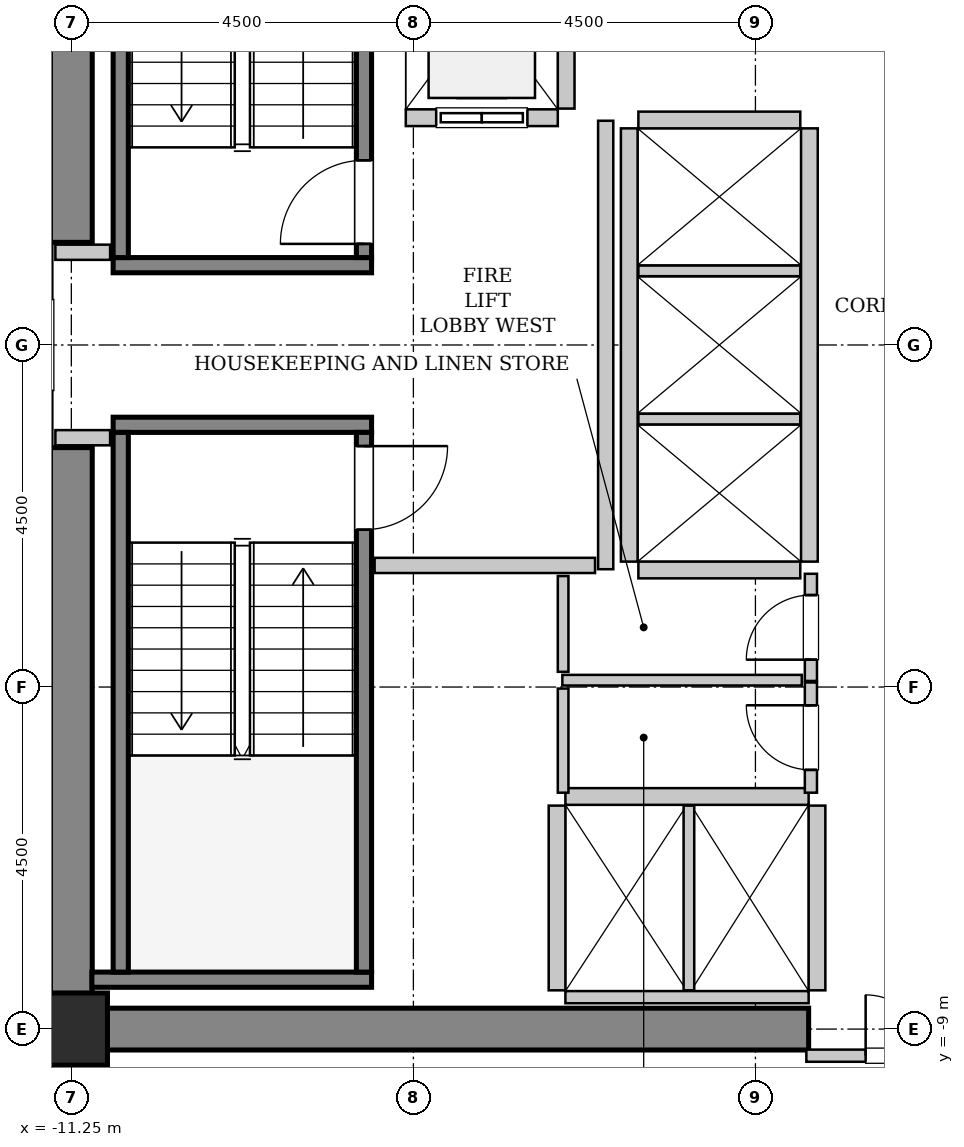
"""IFC4 building model, lengths in metres.
Left out: names, types, materials, properties, quantities, classifications, styles, units other than length and angle.
Written with IfcOpenShell. Run it as: python <this file> out.ifc"""

import sys

from ifc_helpers import new_model, si_unit, direction, frame, frame_2d, origin, origin_2d, place, context, subcontext, project, spatial, rectangle, hollow_rectangle, extrude, source, transform, mapped, element, fill, save


model = new_model("IFC4")
c1 = context("Model", 3, precision=1e-05, world=origin(), true_north=direction((0.0, 1.0)))
c2 = subcontext(c1, "Body", "Model", "MODEL_VIEW")
j1 = project(units=[si_unit("LENGTHUNIT", "METRE"), si_unit("PLANEANGLEUNIT", "RADIAN")], contexts=[c1])
p1 = place(None, origin())
s1 = spatial("IfcSite", under=j1, at=p1, CompositionType="ELEMENT")
p2 = place(p1, origin())
s2 = spatial("IfcBuilding", under=s1, at=p2, CompositionType="ELEMENT")
p3 = place(p2, frame((0.0, 0.0, 90.8)))
s3 = spatial("IfcBuildingStorey", under=s2, at=p3, CompositionType="ELEMENT", Elevation=90.8)
m1 = source(origin(), c2, "Body", "SweptSolid", [
    extrude(rectangle(XDim=9.975, YDim=0.55, at=frame_2d((4.987, 0.0))), origin(), (0.0, 0.0, 1.0), 3.8),
])
p4 = place(p3, frame((-11.525, -9.0, 0.0), z_axis=(0.0, 0.0, 1.0), x_axis=(1.0, 0.0, 0.0)))
e1 = element("IfcWall", 1, at=p4, inside=s3, PredefinedType="SHEAR", context=c2, shape_type="MappedRepresentation", body=[
    mapped(m1, transform((0.0, 0.0, 0.0), x_axis=(1.0, 0.0, 0.0), y_axis=(0.0, 1.0, 0.0), z_axis=(0.0, 0.0, 1.0), scale=1.0)),
])
m2 = source(origin(), c2, "Body", "SweptSolid", [
    extrude(rectangle(XDim=7.375, YDim=0.55, at=frame_2d((3.688, 0.0))), origin(), (0.0, 0.0, 1.0), 3.8),
])
for number, where, z_axis, x_axis in (
    (2, (-11.25, -8.725, 0.0), (0.0, 0.0, 1.0), (0.0, 1.0, 0.0)),
    (3, (-11.25, 1.35, 0.0), (0.0, 0.0, 1.0), (0.0, 1.0, 0.0)),
):
    element("IfcWall", number, at=place(p3, frame(where, z_axis=z_axis, x_axis=x_axis)), inside=s3, PredefinedType="SHEAR", context=c2, shape_type="MappedRepresentation", body=[
        mapped(m2, transform((0.0, 0.0, 0.0), x_axis=(1.0, 0.0, 0.0), y_axis=(0.0, 1.0, 0.0), z_axis=(0.0, 0.0, 1.0), scale=1.0)),
    ])
m3 = source(origin(), c2, "Body", "SweptSolid", [
    extrude(hollow_rectangle(XDim=0.95, YDim=0.95, WallThickness=0.045, InnerFilletRadius=0.045, OuterFilletRadius=0.09, at=origin_2d()), origin(), (0.0, 0.0, 1.0), 3.8),
])
p5 = place(p3, frame((-11.25, -9.0, 0.0), z_axis=(0.0, 0.0, 1.0), x_axis=(1.0, 0.0, 0.0)))
e4 = element("IfcColumn", 4, at=p5, inside=s3, PredefinedType="COLUMN", context=c2, shape_type="MappedRepresentation", body=[
    mapped(m3, transform((0.0, 0.0, 0.0), x_axis=(1.0, 0.0, 0.0), y_axis=(0.0, 1.0, 0.0), z_axis=(0.0, 0.0, 1.0), scale=1.0)),
])
m4 = source(origin(), c2, "Body", "SweptSolid", [
    extrude(rectangle(XDim=3.4, YDim=0.2, at=frame_2d((1.7, 0.0))), origin(), (0.0, 0.0, 1.0), 3.8),
])
p6 = place(p3, frame((-7.3, 1.05, 0.0), z_axis=(0.0, 0.0, 1.0), x_axis=(-1.0, 0.0, 0.0)))
e5 = element("IfcWall", 5, at=p6, inside=s3, PredefinedType="SOLIDWALL", context=c2, shape_type="MappedRepresentation", body=[
    mapped(m4, transform((0.0, 0.0, 0.0), x_axis=(1.0, 0.0, 0.0), y_axis=(0.0, 1.0, 0.0), z_axis=(0.0, 0.0, 1.0), scale=1.0)),
])
m5 = source(origin(), c2, "Body", "SweptSolid", [
    extrude(rectangle(XDim=7.1, YDim=0.2, at=frame_2d((3.55, 0.0))), origin(), (0.0, 0.0, 1.0), 3.8),
])
p7 = place(p3, frame((-7.4, 1.15, 0.0), z_axis=(0.0, 0.0, 1.0), x_axis=(0.0, 1.0, 0.0)))
e6 = element("IfcWall", 6, at=p7, inside=s3, PredefinedType="SOLIDWALL", context=c2, shape_type="MappedRepresentation", body=[
    mapped(m5, transform((0.0, 0.0, 0.0), x_axis=(1.0, 0.0, 0.0), y_axis=(0.0, 1.0, 0.0), z_axis=(0.0, 0.0, 1.0), scale=1.0)),
])
p8 = place(p7, frame((0.18, 0.0, 0.0)))
e7 = element("IfcOpeningElement", 7, at=p8, cuts=e6, PredefinedType="OPENING", context=c2, shape_type="SweptSolid", body=[
    extrude(rectangle(XDim=1.1, YDim=2.15, at=frame_2d((0.55, 1.075))), frame((0.0, 0.11, 0.0), z_axis=(0.0, -1.0, 0.0), x_axis=(1.0, 0.0, 0.0)), (0.0, 0.0, 1.0), 0.22),
])
p9 = place(p3, frame((-10.6, 1.15, 0.0), z_axis=(0.0, 0.0, 1.0), x_axis=(0.0, 1.0, 0.0)))
e8 = element("IfcWall", 8, at=p9, inside=s3, PredefinedType="SOLIDWALL", context=c2, shape_type="MappedRepresentation", body=[
    mapped(m5, transform((0.0, 0.0, 0.0), x_axis=(1.0, 0.0, 0.0), y_axis=(0.0, 1.0, 0.0), z_axis=(0.0, 0.0, 1.0), scale=1.0)),
])
p10 = place(p3, frame((-10.7, -1.05, 0.0), z_axis=(0.0, 0.0, 1.0), x_axis=(1.0, 0.0, 0.0)))
e9 = element("IfcWall", 9, at=p10, inside=s3, PredefinedType="SOLIDWALL", context=c2, shape_type="MappedRepresentation", body=[
    mapped(m4, transform((0.0, 0.0, 0.0), x_axis=(1.0, 0.0, 0.0), y_axis=(0.0, 1.0, 0.0), z_axis=(0.0, 0.0, 1.0), scale=1.0)),
])
m6 = source(origin(), c2, "Body", "SweptSolid", [
    extrude(rectangle(XDim=3.68, YDim=0.2, at=frame_2d((1.84, 0.0))), origin(), (0.0, 0.0, 1.0), 3.8),
])
p11 = place(p3, frame((-10.98, -8.35, 0.0), z_axis=(0.0, 0.0, 1.0), x_axis=(1.0, 0.0, 0.0)))
e10 = element("IfcWall", 10, at=p11, inside=s3, PredefinedType="SOLIDWALL", context=c2, shape_type="MappedRepresentation", body=[
    mapped(m6, transform((0.0, 0.0, 0.0), x_axis=(1.0, 0.0, 0.0), y_axis=(0.0, 1.0, 0.0), z_axis=(0.0, 0.0, 1.0), scale=1.0)),
])
p12 = place(p3, frame((-10.6, -1.15, 0.0), z_axis=(0.0, 0.0, 1.0), x_axis=(0.0, -1.0, 0.0)))
e11 = element("IfcWall", 11, at=p12, inside=s3, PredefinedType="SOLIDWALL", context=c2, shape_type="MappedRepresentation", body=[
    mapped(m5, transform((0.0, 0.0, 0.0), x_axis=(1.0, 0.0, 0.0), y_axis=(0.0, 1.0, 0.0), z_axis=(0.0, 0.0, 1.0), scale=1.0)),
])
p13 = place(p3, frame((-7.4, -1.15, 0.0), z_axis=(0.0, 0.0, 1.0), x_axis=(0.0, -1.0, 0.0)))
e12 = element("IfcWall", 12, at=p13, inside=s3, PredefinedType="SOLIDWALL", context=c2, shape_type="MappedRepresentation", body=[
    mapped(m5, transform((0.0, 0.0, 0.0), x_axis=(1.0, 0.0, 0.0), y_axis=(0.0, 1.0, 0.0), z_axis=(0.0, 0.0, 1.0), scale=1.0)),
])
p14 = place(p13, frame((0.18, 0.0, 0.0)))
e13 = element("IfcOpeningElement", 13, at=p14, cuts=e12, PredefinedType="OPENING", context=c2, shape_type="SweptSolid", body=[
    extrude(rectangle(XDim=1.1, YDim=2.15, at=frame_2d((0.55, 1.075))), frame((0.0, 0.11, 0.0), z_axis=(0.0, -1.0, 0.0), x_axis=(1.0, 0.0, 0.0)), (0.0, 0.0, 1.0), 0.22),
])
m7 = source(origin(), c2, "Body", "SweptSolid", [
    extrude(rectangle(XDim=2.0, YDim=0.22, at=frame_2d((1.0, 0.0))), origin(), (0.0, 0.0, 1.0), 3.535),
])
p15 = place(p3, frame((-6.85, 2.99, 0.0), z_axis=(0.0, 0.0, 1.0), x_axis=(1.0, 0.0, 0.0)))
e14 = element("IfcWall", 14, at=p15, inside=s3, PredefinedType="SOLIDWALL", context=c2, shape_type="MappedRepresentation", body=[
    mapped(m7, transform((0.0, 0.0, 0.0), x_axis=(1.0, 0.0, 0.0), y_axis=(0.0, 1.0, 0.0), z_axis=(0.0, 0.0, 1.0), scale=1.0)),
])
p16 = place(p15, frame((0.4, 0.0, 0.0)))
e15 = element("IfcOpeningElement", 15, at=p16, cuts=e14, PredefinedType="OPENING", context=c2, shape_type="SweptSolid", body=[
    extrude(rectangle(XDim=1.2, YDim=2.2, at=frame_2d((0.6, 1.1))), frame((0.0, 0.12, 0.0), z_axis=(0.0, -1.0, 0.0), x_axis=(1.0, 0.0, 0.0)), (0.0, 0.0, 1.0), 0.24),
])
m8 = source(origin(), c2, "Body", "SweptSolid", [
    extrude(rectangle(XDim=2.68, YDim=0.22, at=frame_2d((1.34, 0.0))), origin(), (0.0, 0.0, 1.0), 3.535),
])
p17 = place(p3, frame((-4.74, 3.11, 0.0), z_axis=(0.0, 0.0, 1.0), x_axis=(0.0, 1.0, 0.0)))
e16 = element("IfcWall", 16, at=p17, inside=s3, PredefinedType="SOLIDWALL", context=c2, shape_type="MappedRepresentation", body=[
    mapped(m8, transform((0.0, 0.0, 0.0), x_axis=(1.0, 0.0, 0.0), y_axis=(0.0, 1.0, 0.0), z_axis=(0.0, 0.0, 1.0), scale=1.0)),
])
m9 = source(origin(), c2, "Body", "SweptSolid", [
    extrude(rectangle(XDim=3.2, YDim=0.22, at=frame_2d((1.6, 0.0))), origin(), (0.0, 0.0, 1.0), 3.535),
])
p18 = place(p3, frame((-1.55, -5.94, 0.0), z_axis=(0.0, 0.0, 1.0), x_axis=(-1.0, 0.0, 0.0)))
e17 = element("IfcWall", 17, at=p18, inside=s3, PredefinedType="SOLIDWALL", context=c2, shape_type="MappedRepresentation", body=[
    mapped(m9, transform((0.0, 0.0, 0.0), x_axis=(1.0, 0.0, 0.0), y_axis=(0.0, 1.0, 0.0), z_axis=(0.0, 0.0, 1.0), scale=1.0)),
])
m10 = source(origin(), c2, "Body", "SweptSolid", [
    extrude(rectangle(XDim=3.2, YDim=0.16, at=frame_2d((1.6, 0.0))), origin(), (0.0, 0.0, 1.0), 2.425),
])
p19 = place(p3, frame((-4.75, -8.58, 0.0), z_axis=(0.0, 0.0, 1.0), x_axis=(1.0, 0.0, 0.0)))
e18 = element("IfcWall", 18, at=p19, inside=s3, PredefinedType="PARTITIONING", context=c2, shape_type="MappedRepresentation", body=[
    mapped(m10, transform((0.0, 0.0, 0.0), x_axis=(1.0, 0.0, 0.0), y_axis=(0.0, 1.0, 0.0), z_axis=(0.0, 0.0, 1.0), scale=1.0)),
])
m11 = source(origin(), c2, "Body", "SweptSolid", [
    extrude(rectangle(XDim=2.43, YDim=0.22, at=frame_2d((1.215, 0.0))), origin(), (0.0, 0.0, 1.0), 3.535),
])
p20 = place(p3, frame((-4.86, -6.06, 0.0), z_axis=(0.0, 0.0, 1.0), x_axis=(0.0, -1.0, 0.0)))
e19 = element("IfcWall", 19, at=p20, inside=s3, PredefinedType="SOLIDWALL", context=c2, shape_type="MappedRepresentation", body=[
    mapped(m11, transform((0.0, 0.0, 0.0), x_axis=(1.0, 0.0, 0.0), y_axis=(0.0, 1.0, 0.0), z_axis=(0.0, 0.0, 1.0), scale=1.0)),
])
m12 = source(origin(), c2, "Body", "SweptSolid", [
    extrude(rectangle(XDim=2.43, YDim=0.14, at=frame_2d((1.215, 0.0))), origin(), (0.0, 0.0, 1.0), 3.535),
])
p21 = place(p3, frame((-3.125, -8.49, 0.0), z_axis=(0.0, 0.0, 1.0), x_axis=(0.0, 1.0, 0.0)))
e20 = element("IfcWall", 20, at=p21, inside=s3, PredefinedType="PARTITIONING", context=c2, shape_type="MappedRepresentation", body=[
    mapped(m12, transform((0.0, 0.0, 0.0), x_axis=(1.0, 0.0, 0.0), y_axis=(0.0, 1.0, 0.0), z_axis=(0.0, 0.0, 1.0), scale=1.0)),
])
p22 = place(p3, frame((-1.44, -8.49, 0.0), z_axis=(0.0, 0.0, 1.0), x_axis=(0.0, 1.0, 0.0)))
e21 = element("IfcWall", 21, at=p22, inside=s3, PredefinedType="SOLIDWALL", context=c2, shape_type="MappedRepresentation", body=[
    mapped(m11, transform((0.0, 0.0, 0.0), x_axis=(1.0, 0.0, 0.0), y_axis=(0.0, 1.0, 0.0), z_axis=(0.0, 0.0, 1.0), scale=1.0)),
])
m13 = source(origin(), c2, "Body", "SweptSolid", [
    extrude(rectangle(XDim=5.7, YDim=0.22, at=frame_2d((2.85, 0.0))), origin(), (0.0, 0.0, 1.0), 3.535),
])
for number, where, z_axis, x_axis in (
    (22, (-1.54, -2.85, 0.0), (0.0, 0.0, 1.0), (0.0, 1.0, 0.0)),
    (23, (-3.91, 2.85, 0.0), (0.0, 0.0, 1.0), (0.0, -1.0, 0.0)),
):
    element("IfcWall", number, at=place(p3, frame(where, z_axis=z_axis, x_axis=x_axis)), inside=s3, PredefinedType="SOLIDWALL", context=c2, shape_type="MappedRepresentation", body=[
        mapped(m13, transform((0.0, 0.0, 0.0), x_axis=(1.0, 0.0, 0.0), y_axis=(0.0, 1.0, 0.0), z_axis=(0.0, 0.0, 1.0), scale=1.0)),
    ])
m14 = source(origin(), c2, "Body", "SweptSolid", [
    extrude(rectangle(XDim=2.13, YDim=0.22, at=frame_2d((1.065, 0.0))), origin(), (0.0, 0.0, 1.0), 3.535),
])
p23 = place(p3, frame((-3.79, -2.96, 0.0), z_axis=(0.0, 0.0, 1.0), x_axis=(1.0, 0.0, 0.0)))
e24 = element("IfcWall", 24, at=p23, inside=s3, PredefinedType="SOLIDWALL", context=c2, shape_type="MappedRepresentation", body=[
    mapped(m14, transform((0.0, 0.0, 0.0), x_axis=(1.0, 0.0, 0.0), y_axis=(0.0, 1.0, 0.0), z_axis=(0.0, 0.0, 1.0), scale=1.0)),
])
m15 = source(origin(), c2, "Body", "SweptSolid", [
    extrude(rectangle(XDim=2.13, YDim=0.14, at=frame_2d((1.065, 0.0))), origin(), (0.0, 0.0, 1.0), 3.535),
])
for number, where, z_axis, x_axis in (
    (25, (-3.79, -0.975, 0.0), (0.0, 0.0, 1.0), (1.0, 0.0, 0.0)),
    (26, (-3.79, 0.975, 0.0), (0.0, 0.0, 1.0), (1.0, 0.0, 0.0)),
):
    element("IfcWall", number, at=place(p3, frame(where, z_axis=z_axis, x_axis=x_axis)), inside=s3, PredefinedType="PARTITIONING", context=c2, shape_type="MappedRepresentation", body=[
        mapped(m15, transform((0.0, 0.0, 0.0), x_axis=(1.0, 0.0, 0.0), y_axis=(0.0, 1.0, 0.0), z_axis=(0.0, 0.0, 1.0), scale=1.0)),
    ])
p24 = place(p3, frame((-1.66, 2.96, 0.0), z_axis=(0.0, 0.0, 1.0), x_axis=(-1.0, 0.0, 0.0)))
e27 = element("IfcWall", 27, at=p24, inside=s3, PredefinedType="SOLIDWALL", context=c2, shape_type="MappedRepresentation", body=[
    mapped(m14, transform((0.0, 0.0, 0.0), x_axis=(1.0, 0.0, 0.0), y_axis=(0.0, 1.0, 0.0), z_axis=(0.0, 0.0, 1.0), scale=1.0)),
])
m16 = source(origin(), c2, "Body", "SweptSolid", [
    extrude(rectangle(XDim=5.9, YDim=0.2, at=frame_2d((2.95, 0.0))), origin(), (0.0, 0.0, 1.0), 3.535),
])
p25 = place(p3, frame((-4.22, -2.95, 0.0), z_axis=(0.0, 0.0, 1.0), x_axis=(0.0, 1.0, 0.0)))
e28 = element("IfcWall", 28, at=p25, inside=s3, PredefinedType="PARTITIONING", context=c2, shape_type="MappedRepresentation", body=[
    mapped(m16, transform((0.0, 0.0, 0.0), x_axis=(1.0, 0.0, 0.0), y_axis=(0.0, 1.0, 0.0), z_axis=(0.0, 0.0, 1.0), scale=1.0)),
])
m17 = source(origin(), c2, "Body", "SweptSolid", [
    extrude(rectangle(XDim=2.9, YDim=0.2, at=frame_2d((1.45, 0.0))), origin(), (0.0, 0.0, 1.0), 3.535),
])
p26 = place(p3, frame((-7.26, -2.9, 0.0), z_axis=(0.0, 0.0, 1.0), x_axis=(1.0, 0.0, 0.0)))
e29 = element("IfcWall", 29, at=p26, inside=s3, PredefinedType="PARTITIONING", context=c2, shape_type="MappedRepresentation", body=[
    mapped(m17, transform((0.0, 0.0, 0.0), x_axis=(1.0, 0.0, 0.0), y_axis=(0.0, 1.0, 0.0), z_axis=(0.0, 0.0, 1.0), scale=1.0)),
])
m18 = source(origin(), c2, "Body", "SweptSolid", [
    extrude(rectangle(XDim=0.72, YDim=0.2, at=frame_2d((0.36, 0.0))), origin(), (0.0, 0.0, 1.0), 3.535),
])
for number, where, z_axis, x_axis in (
    (30, (-11.46, 1.22, 0.0), (0.0, 0.0, 1.0), (1.0, 0.0, 0.0)),
    (31, (-11.46, -1.22, 0.0), (0.0, 0.0, 1.0), (1.0, 0.0, 0.0)),
):
    element("IfcWall", number, at=place(p3, frame(where, z_axis=z_axis, x_axis=x_axis)), inside=s3, PredefinedType="PARTITIONING", context=c2, shape_type="MappedRepresentation", body=[
        mapped(m18, transform((0.0, 0.0, 0.0), x_axis=(1.0, 0.0, 0.0), y_axis=(0.0, 1.0, 0.0), z_axis=(0.0, 0.0, 1.0), scale=1.0)),
    ])
m19 = source(origin(), c2, "Body", "SweptSolid", [
    extrude(rectangle(XDim=3.16, YDim=0.16, at=frame_2d((1.58, 0.0))), origin(), (0.0, 0.0, 1.0), 2.425),
])
p27 = place(p3, frame((-1.58, -9.35, 0.0), z_axis=(0.0, 0.0, 1.0), x_axis=(1.0, 0.0, 0.0)))
e32 = element("IfcWall", 32, at=p27, inside=s3, PredefinedType="PARTITIONING", context=c2, shape_type="MappedRepresentation", body=[
    mapped(m19, transform((0.0, 0.0, 0.0), x_axis=(1.0, 0.0, 0.0), y_axis=(0.0, 1.0, 0.0), z_axis=(0.0, 0.0, 1.0), scale=1.0)),
])
p28 = place(p27, frame((0.78, 0.0, 0.0)))
e33 = element("IfcOpeningElement", 33, at=p28, cuts=e32, PredefinedType="OPENING", context=c2, shape_type="SweptSolid", body=[
    extrude(rectangle(XDim=1.6, YDim=2.3, at=frame_2d((0.8, 1.15))), frame((0.0, 0.09, 0.0), z_axis=(0.0, -1.0, 0.0), x_axis=(1.0, 0.0, 0.0)), (0.0, 0.0, 1.0), 0.18),
])
m20 = source(origin(), c2, "Body", "SweptSolid", [
    extrude(rectangle(XDim=1.41, YDim=0.16, at=frame_2d((0.705, 0.0))), origin(), (0.0, 0.0, 1.0), 3.535),
])
p29 = place(p3, frame((-1.52, -4.42, 0.0), z_axis=(0.0, 0.0, 1.0), x_axis=(0.0, 1.0, 0.0)))
e34 = element("IfcWall", 34, at=p29, inside=s3, PredefinedType="PARTITIONING", context=c2, shape_type="MappedRepresentation", body=[
    mapped(m20, transform((0.0, 0.0, 0.0), x_axis=(1.0, 0.0, 0.0), y_axis=(0.0, 1.0, 0.0), z_axis=(0.0, 0.0, 1.0), scale=1.0)),
])
p30 = place(p29, frame((0.28, 0.0, 0.0)))
e35 = element("IfcOpeningElement", 35, at=p30, cuts=e34, PredefinedType="OPENING", context=c2, shape_type="SweptSolid", body=[
    extrude(rectangle(XDim=0.85, YDim=2.1, at=frame_2d((0.425, 1.05))), frame((0.0, 0.09, 0.0), z_axis=(0.0, -1.0, 0.0), x_axis=(1.0, 0.0, 0.0)), (0.0, 0.0, 1.0), 0.18),
])
m21 = source(origin(), c2, "Body", "SweptSolid", [
    extrude(rectangle(XDim=3.15, YDim=0.14, at=frame_2d((1.575, 0.0))), origin(), (0.0, 0.0, 1.0), 3.535),
])
p31 = place(p3, frame((-4.79, -4.41, 0.0), z_axis=(0.0, 0.0, 1.0), x_axis=(1.0, 0.0, 0.0)))
e36 = element("IfcWall", 36, at=p31, inside=s3, PredefinedType="PARTITIONING", context=c2, shape_type="MappedRepresentation", body=[
    mapped(m21, transform((0.0, 0.0, 0.0), x_axis=(1.0, 0.0, 0.0), y_axis=(0.0, 1.0, 0.0), z_axis=(0.0, 0.0, 1.0), scale=1.0)),
])
m22 = source(origin(), c2, "Body", "SweptSolid", [
    extrude(rectangle(XDim=1.26, YDim=0.14, at=frame_2d((0.63, 0.0))), origin(), (0.0, 0.0, 1.0), 3.535),
])
p32 = place(p3, frame((-4.78, -4.3, 0.0), z_axis=(0.0, 0.0, 1.0), x_axis=(0.0, 1.0, 0.0)))
e37 = element("IfcWall", 37, at=p32, inside=s3, PredefinedType="PARTITIONING", context=c2, shape_type="MappedRepresentation", body=[
    mapped(m22, transform((0.0, 0.0, 0.0), x_axis=(1.0, 0.0, 0.0), y_axis=(0.0, 1.0, 0.0), z_axis=(0.0, 0.0, 1.0), scale=1.0)),
])
m23 = source(origin(), c2, "Body", "SweptSolid", [
    extrude(rectangle(XDim=1.45, YDim=0.16, at=frame_2d((0.725, 0.0))), origin(), (0.0, 0.0, 1.0), 3.535),
])
p33 = place(p3, frame((-1.52, -5.89, 0.0), z_axis=(0.0, 0.0, 1.0), x_axis=(0.0, 1.0, 0.0)))
e38 = element("IfcWall", 38, at=p33, inside=s3, PredefinedType="PARTITIONING", context=c2, shape_type="MappedRepresentation", body=[
    mapped(m23, transform((0.0, 0.0, 0.0), x_axis=(1.0, 0.0, 0.0), y_axis=(0.0, 1.0, 0.0), z_axis=(0.0, 0.0, 1.0), scale=1.0)),
])
p34 = place(p33, frame((0.3, 0.0, 0.0)))
e39 = element("IfcOpeningElement", 39, at=p34, cuts=e38, PredefinedType="OPENING", context=c2, shape_type="SweptSolid", body=[
    extrude(rectangle(XDim=0.85, YDim=2.1, at=frame_2d((0.425, 1.05))), frame((0.0, 0.09, 0.0), z_axis=(0.0, -1.0, 0.0), x_axis=(1.0, 0.0, 0.0)), (0.0, 0.0, 1.0), 0.18),
])
m24 = source(origin(), c2, "Body", "SweptSolid", [
    extrude(rectangle(XDim=1.37, YDim=0.14, at=frame_2d((0.685, 0.0))), origin(), (0.0, 0.0, 1.0), 3.535),
])
p35 = place(p3, frame((-4.78, -5.89, 0.0), z_axis=(0.0, 0.0, 1.0), x_axis=(0.0, 1.0, 0.0)))
e40 = element("IfcWall", 40, at=p35, inside=s3, PredefinedType="PARTITIONING", context=c2, shape_type="MappedRepresentation", body=[
    mapped(m24, transform((0.0, 0.0, 0.0), x_axis=(1.0, 0.0, 0.0), y_axis=(0.0, 1.0, 0.0), z_axis=(0.0, 0.0, 1.0), scale=1.0)),
])
m25 = source(origin(), c2, "Body", "SweptSolid", [
    extrude(rectangle(XDim=1.1, YDim=2.15, at=frame_2d((0.55, 1.075))), frame((0.0, 0.025, 0.0), z_axis=(0.0, -1.0, 0.0), x_axis=(1.0, 0.0, 0.0)), (0.0, 0.0, 1.0), 0.05),
])
p36 = place(p8, origin())
e41 = element("IfcDoor", 41, at=p36, inside=s3, OperationType="SINGLE_SWING_LEFT", PredefinedType="DOOR", context=c2, shape_type="MappedRepresentation", body=[
    mapped(m25, transform((0.0, 0.0, 0.0), x_axis=(1.0, 0.0, 0.0), y_axis=(0.0, 1.0, 0.0), z_axis=(0.0, 0.0, 1.0), scale=1.0)),
])
fill(e7, e41)
p37 = place(p14, origin())
e42 = element("IfcDoor", 42, at=p37, inside=s3, OperationType="SINGLE_SWING_LEFT", PredefinedType="DOOR", context=c2, shape_type="MappedRepresentation", body=[
    mapped(m25, transform((0.0, 0.0, 0.0), x_axis=(1.0, 0.0, 0.0), y_axis=(0.0, 1.0, 0.0), z_axis=(0.0, 0.0, 1.0), scale=1.0)),
])
fill(e13, e42)
m26 = source(origin(), c2, "Body", "SweptSolid", [
    extrude(rectangle(XDim=1.2, YDim=2.2, at=frame_2d((0.6, 1.1))), frame((0.0, 0.025, 0.0), z_axis=(0.0, -1.0, 0.0), x_axis=(1.0, 0.0, 0.0)), (0.0, 0.0, 1.0), 0.05),
])
p38 = place(p16, origin())
e43 = element("IfcDoor", 43, at=p38, inside=s3, OperationType="SLIDING_TO_LEFT", PredefinedType="DOOR", context=c2, shape_type="MappedRepresentation", body=[
    mapped(m26, transform((0.0, 0.0, 0.0), x_axis=(1.0, 0.0, 0.0), y_axis=(0.0, 1.0, 0.0), z_axis=(0.0, 0.0, 1.0), scale=1.0)),
])
fill(e15, e43)
m27 = source(origin(), c2, "Body", "SweptSolid", [
    extrude(rectangle(XDim=1.6, YDim=2.3, at=frame_2d((0.8, 1.15))), frame((0.0, 0.025, 0.0), z_axis=(0.0, -1.0, 0.0), x_axis=(1.0, 0.0, 0.0)), (0.0, 0.0, 1.0), 0.05),
])
p39 = place(p28, origin())
e44 = element("IfcDoor", 44, at=p39, inside=s3, OperationType="DOUBLE_DOOR_SINGLE_SWING", PredefinedType="DOOR", context=c2, shape_type="MappedRepresentation", body=[
    mapped(m27, transform((0.0, 0.0, 0.0), x_axis=(1.0, 0.0, 0.0), y_axis=(0.0, 1.0, 0.0), z_axis=(0.0, 0.0, 1.0), scale=1.0)),
])
fill(e33, e44)
m28 = source(origin(), c2, "Body", "SweptSolid", [
    extrude(rectangle(XDim=0.85, YDim=2.1, at=frame_2d((0.425, 1.05))), frame((0.0, 0.025, 0.0), z_axis=(0.0, -1.0, 0.0), x_axis=(1.0, 0.0, 0.0)), (0.0, 0.0, 1.0), 0.05),
])
p40 = place(p30, origin())
e45 = element("IfcDoor", 45, at=p40, inside=s3, OperationType="SINGLE_SWING_LEFT", PredefinedType="DOOR", context=c2, shape_type="MappedRepresentation", body=[
    mapped(m28, transform((0.0, 0.0, 0.0), x_axis=(1.0, 0.0, 0.0), y_axis=(0.0, 1.0, 0.0), z_axis=(0.0, 0.0, 1.0), scale=1.0)),
])
fill(e35, e45)
p41 = place(p34, origin())
e46 = element("IfcDoor", 46, at=p41, inside=s3, OperationType="SINGLE_SWING_RIGHT", PredefinedType="DOOR", context=c2, shape_type="MappedRepresentation", body=[
    mapped(m28, transform((0.0, 0.0, 0.0), x_axis=(1.0, 0.0, 0.0), y_axis=(0.0, 1.0, 0.0), z_axis=(0.0, 0.0, 1.0), scale=1.0)),
])
fill(e39, e46)
save(model, sys.argv[1])
